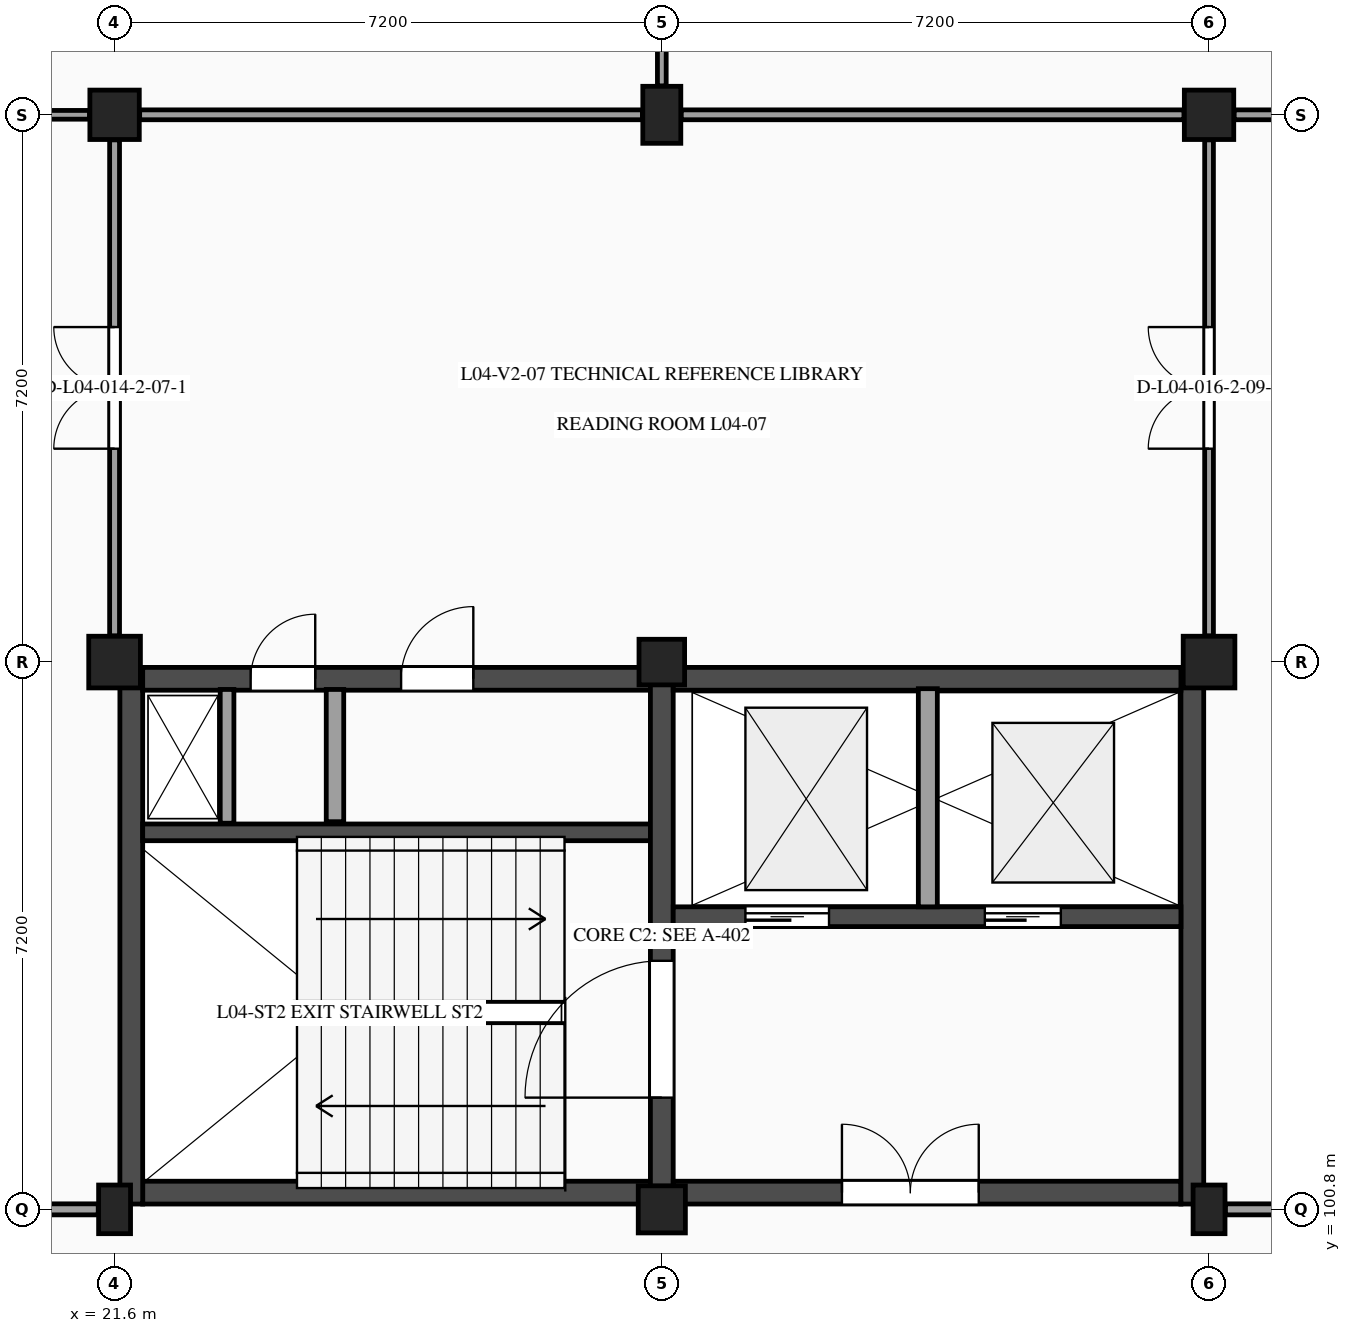
"""IFC4 building model, lengths in metres.
Left out: names, types, materials, properties, quantities, classifications, styles, units other than length and angle.
Written with IfcOpenShell. Run it as: python <this file> out.ifc"""

import sys

from ifc_helpers import new_model, si_unit, direction, frame, frame_2d, origin, origin_2d, place, context, subcontext, project, spatial, rectangle, extrude, element, fill, save


model = new_model("IFC4")
c1 = context("Model", 3, precision=1e-05, world=origin(), true_north=direction((0.0, 1.0)))
c2 = subcontext(c1, "Body", "Model", "MODEL_VIEW")
j1 = project(units=[si_unit("LENGTHUNIT", "METRE"), si_unit("PLANEANGLEUNIT", "RADIAN")], contexts=[c1])
p1 = place(None, origin())
s1 = spatial("IfcSite", under=j1, at=p1, CompositionType="ELEMENT")
p2 = place(p1, origin())
s2 = spatial("IfcBuilding", under=s1, at=p2, CompositionType="ELEMENT")
p3 = place(p2, frame((0.0, 0.0, 18.6)))
s3 = spatial("IfcBuildingStorey", under=s2, at=p3, CompositionType="ELEMENT", Elevation=18.6)
p4 = place(p3, frame((21.6, 100.8, 0.0), z_axis=(0.0, 0.0, 1.0), x_axis=(1.0, 0.0, 0.0)))
e1 = element("IfcColumn", 1, at=p4, inside=s3, PredefinedType="PILASTER", context=c2, shape_type="SweptSolid", body=[
    extrude(rectangle(XDim=0.42, YDim=0.64, at=origin_2d()), origin(), (0.0, 0.0, 1.0), 4.2),
])
p5 = place(p3, frame((21.6, 108.0, 0.0), z_axis=(0.0, 0.0, 1.0), x_axis=(1.0, 0.0, 0.0)))
e2 = element("IfcColumn", 2, at=p5, inside=s3, PredefinedType="COLUMN", context=c2, shape_type="SweptSolid", body=[
    extrude(rectangle(XDim=0.68, YDim=0.68, at=origin_2d()), origin(), (0.0, 0.0, 1.0), 4.2),
])
p6 = place(p3, frame((21.6, 115.2, 0.0), z_axis=(0.0, 0.0, 1.0), x_axis=(1.0, 0.0, 0.0)))
e3 = element("IfcColumn", 3, at=p6, inside=s3, PredefinedType="COLUMN", context=c2, shape_type="SweptSolid", body=[
    extrude(rectangle(XDim=0.65, YDim=0.65, at=origin_2d()), origin(), (0.0, 0.0, 1.0), 4.2),
])
p7 = place(p3, frame((28.8, 100.8, 0.0), z_axis=(0.0, 0.0, 1.0), x_axis=(1.0, 0.0, 0.0)))
e4 = element("IfcColumn", 4, at=p7, inside=s3, PredefinedType="COLUMN", context=c2, shape_type="SweptSolid", body=[
    extrude(rectangle(XDim=0.62, YDim=0.62, at=origin_2d()), origin(), (0.0, 0.0, 1.0), 4.2),
])
p8 = place(p3, frame((28.8, 108.0, 0.0), z_axis=(0.0, 0.0, 1.0), x_axis=(1.0, 0.0, 0.0)))
e5 = element("IfcColumn", 5, at=p8, inside=s3, PredefinedType="COLUMN", context=c2, shape_type="SweptSolid", body=[
    extrude(rectangle(XDim=0.6, YDim=0.6, at=origin_2d()), origin(), (0.0, 0.0, 1.0), 4.2),
])
p9 = place(p3, frame((28.8, 115.2, 0.0), z_axis=(0.0, 0.0, 1.0), x_axis=(1.0, 0.0, 0.0)))
e6 = element("IfcColumn", 6, at=p9, inside=s3, PredefinedType="COLUMN", context=c2, shape_type="SweptSolid", body=[
    extrude(rectangle(XDim=0.5, YDim=0.75, at=origin_2d()), origin(), (0.0, 0.0, 1.0), 4.2),
])
p10 = place(p3, frame((36.0, 100.8, 0.0), z_axis=(0.0, 0.0, 1.0), x_axis=(1.0, 0.0, 0.0)))
e7 = element("IfcColumn", 7, at=p10, inside=s3, PredefinedType="PILASTER", context=c2, shape_type="SweptSolid", body=[
    extrude(rectangle(XDim=0.42, YDim=0.64, at=origin_2d()), origin(), (0.0, 0.0, 1.0), 4.2),
])
p11 = place(p3, frame((36.0, 108.0, 0.0), z_axis=(0.0, 0.0, 1.0), x_axis=(1.0, 0.0, 0.0)))
e8 = element("IfcColumn", 8, at=p11, inside=s3, PredefinedType="COLUMN", context=c2, shape_type="SweptSolid", body=[
    extrude(rectangle(XDim=0.68, YDim=0.68, at=origin_2d()), origin(), (0.0, 0.0, 1.0), 4.2),
])
p12 = place(p3, frame((36.0, 115.2, 0.0), z_axis=(0.0, 0.0, 1.0), x_axis=(1.0, 0.0, 0.0)))
e9 = element("IfcColumn", 9, at=p12, inside=s3, PredefinedType="COLUMN", context=c2, shape_type="SweptSolid", body=[
    extrude(rectangle(XDim=0.65, YDim=0.65, at=origin_2d()), origin(), (0.0, 0.0, 1.0), 4.2),
])
p13 = place(p3, frame((21.97, 101.02, 0.0), z_axis=(0.0, 0.0, 1.0), x_axis=(1.0, 0.0, 0.0)))
e10 = element("IfcWall", 10, at=p13, inside=s3, PredefinedType="SHEAR", context=c2, shape_type="SweptSolid", body=[
    extrude(rectangle(XDim=6.68, YDim=0.3, at=frame_2d((3.34, 0.0))), origin(), (0.0, 0.0, 1.0), 3.955),
])
p14 = place(p3, frame((21.82, 107.93, 0.0), z_axis=(0.0, 0.0, 1.0), x_axis=(0.0, -1.0, 0.0)))
e11 = element("IfcWall", 11, at=p14, inside=s3, PredefinedType="SHEAR", context=c2, shape_type="SweptSolid", body=[
    extrude(rectangle(XDim=7.06, YDim=0.3, at=frame_2d((3.53, 0.0))), origin(), (0.0, 0.0, 1.0), 3.955),
])
p15 = place(p3, frame((21.97, 107.78, 0.0), z_axis=(0.0, 0.0, 1.0), x_axis=(1.0, 0.0, 0.0)))
e12 = element("IfcWall", 12, at=p15, inside=s3, PredefinedType="SHEAR", context=c2, shape_type="SweptSolid", body=[
    extrude(rectangle(XDim=6.68, YDim=0.3, at=frame_2d((3.34, 0.0))), origin(), (0.0, 0.0, 1.0), 3.955),
])
p16 = place(p15, frame((1.42, 0.0, 0.0)))
e13 = element("IfcOpeningElement", 13, at=p16, cuts=e12, PredefinedType="OPENING", context=c2, shape_type="SweptSolid", body=[
    extrude(rectangle(XDim=0.85, YDim=2.1, at=frame_2d((0.425, 1.05))), frame((0.0, 0.16, 0.0), z_axis=(0.0, -1.0, 0.0), x_axis=(1.0, 0.0, 0.0)), (0.0, 0.0, 1.0), 0.32),
])
p17 = place(p15, frame((3.4, 0.0, 0.0)))
e14 = element("IfcOpeningElement", 14, at=p17, cuts=e12, PredefinedType="OPENING", context=c2, shape_type="SweptSolid", body=[
    extrude(rectangle(XDim=0.95, YDim=2.15, at=frame_2d((0.475, 1.075))), frame((0.0, 0.16, 0.0), z_axis=(0.0, -1.0, 0.0), x_axis=(1.0, 0.0, 0.0)), (0.0, 0.0, 1.0), 0.32),
])
p18 = place(p3, frame((21.97, 105.76, 0.0), z_axis=(0.0, 0.0, 1.0), x_axis=(1.0, 0.0, 0.0)))
e15 = element("IfcWall", 15, at=p18, inside=s3, PredefinedType="SHEAR", context=c2, shape_type="SweptSolid", body=[
    extrude(rectangle(XDim=6.68, YDim=0.22, at=frame_2d((3.34, 0.0))), origin(), (0.0, 0.0, 1.0), 3.955),
])
p19 = place(p3, frame((24.5, 105.9, 0.0), z_axis=(0.0, 0.0, 1.0), x_axis=(0.0, 1.0, 0.0)))
e16 = element("IfcWall", 16, at=p19, inside=s3, PredefinedType="PARTITIONING", context=c2, shape_type="SweptSolid", body=[
    extrude(rectangle(XDim=1.74, YDim=0.23, at=frame_2d((0.87, 0.0))), origin(), (0.0, 0.0, 1.0), 3.955),
])
p20 = place(p3, frame((23.08, 105.88, 0.0), z_axis=(0.0, 0.0, 1.0), x_axis=(0.0, 1.0, 0.0)))
e17 = element("IfcWall", 17, at=p20, inside=s3, PredefinedType="PARTITIONING", context=c2, shape_type="SweptSolid", body=[
    extrude(rectangle(XDim=1.76, YDim=0.18, at=frame_2d((0.88, 0.0))), origin(), (0.0, 0.0, 1.0), 3.955),
])
p21 = place(p3, frame((28.8, 100.87, 0.0), z_axis=(0.0, 0.0, 1.0), x_axis=(0.0, 1.0, 0.0)))
e18 = element("IfcWall", 18, at=p21, inside=s3, PredefinedType="SHEAR", context=c2, shape_type="SweptSolid", body=[
    extrude(rectangle(XDim=7.06, YDim=0.3, at=frame_2d((3.53, 0.0))), origin(), (0.0, 0.0, 1.0), 3.955),
])
p22 = place(p21, frame((1.4, 0.0, 0.0)))
e19 = element("IfcOpeningElement", 19, at=p22, cuts=e18, PredefinedType="OPENING", context=c2, shape_type="SweptSolid", body=[
    extrude(rectangle(XDim=1.8, YDim=2.2, at=frame_2d((0.9, 1.1))), frame((0.0, 0.16, 0.0), z_axis=(0.0, -1.0, 0.0), x_axis=(1.0, 0.0, 0.0)), (0.0, 0.0, 1.0), 0.32),
])
p23 = place(p3, frame((28.95, 101.02, 0.0), z_axis=(0.0, 0.0, 1.0), x_axis=(1.0, 0.0, 0.0)))
e20 = element("IfcWall", 20, at=p23, inside=s3, PredefinedType="SHEAR", context=c2, shape_type="SweptSolid", body=[
    extrude(rectangle(XDim=6.68, YDim=0.3, at=frame_2d((3.34, 0.0))), origin(), (0.0, 0.0, 1.0), 3.955),
])
p24 = place(p23, frame((2.22, 0.0, 0.0)))
e21 = element("IfcOpeningElement", 21, at=p24, cuts=e20, PredefinedType="OPENING", context=c2, shape_type="SweptSolid", body=[
    extrude(rectangle(XDim=1.8, YDim=2.2, at=frame_2d((0.9, 1.1))), frame((0.0, 0.16, 0.0), z_axis=(0.0, -1.0, 0.0), x_axis=(1.0, 0.0, 0.0)), (0.0, 0.0, 1.0), 0.32),
])
p25 = place(p3, frame((35.78, 100.87, 0.0), z_axis=(0.0, 0.0, 1.0), x_axis=(0.0, 1.0, 0.0)))
e22 = element("IfcWall", 22, at=p25, inside=s3, PredefinedType="SHEAR", context=c2, shape_type="SweptSolid", body=[
    extrude(rectangle(XDim=7.06, YDim=0.3, at=frame_2d((3.53, 0.0))), origin(), (0.0, 0.0, 1.0), 3.955),
])
p26 = place(p3, frame((28.95, 107.78, 0.0), z_axis=(0.0, 0.0, 1.0), x_axis=(1.0, 0.0, 0.0)))
e23 = element("IfcWall", 23, at=p26, inside=s3, PredefinedType="SHEAR", context=c2, shape_type="SweptSolid", body=[
    extrude(rectangle(XDim=6.68, YDim=0.3, at=frame_2d((3.34, 0.0))), origin(), (0.0, 0.0, 1.0), 3.955),
])
p27 = place(p3, frame((28.95, 104.65, 0.0), z_axis=(0.0, 0.0, 1.0), x_axis=(1.0, 0.0, 0.0)))
e24 = element("IfcWall", 24, at=p27, inside=s3, PredefinedType="SHEAR", context=c2, shape_type="SweptSolid", body=[
    extrude(rectangle(XDim=6.68, YDim=0.26, at=frame_2d((3.34, 0.0))), origin(), (0.0, 0.0, 1.0), 3.955),
])
p28 = place(p27, frame((0.95, 0.0, 0.0)))
e25 = element("IfcOpeningElement", 25, at=p28, cuts=e24, PredefinedType="OPENING", context=c2, shape_type="SweptSolid", body=[
    extrude(rectangle(XDim=1.1, YDim=2.2, at=frame_2d((0.55, 1.1))), frame((0.0, 0.14, 0.0), z_axis=(0.0, -1.0, 0.0), x_axis=(1.0, 0.0, 0.0)), (0.0, 0.0, 1.0), 0.28),
])
p29 = place(p27, frame((4.1, 0.0, 0.0)))
e26 = element("IfcOpeningElement", 26, at=p29, cuts=e24, PredefinedType="OPENING", context=c2, shape_type="SweptSolid", body=[
    extrude(rectangle(XDim=1.0, YDim=2.15, at=frame_2d((0.5, 1.075))), frame((0.0, 0.14, 0.0), z_axis=(0.0, -1.0, 0.0), x_axis=(1.0, 0.0, 0.0)), (0.0, 0.0, 1.0), 0.28),
])
p30 = place(p3, frame((32.3, 104.78, 0.0), z_axis=(0.0, 0.0, 1.0), x_axis=(0.0, 1.0, 0.0)))
e27 = element("IfcWall", 27, at=p30, inside=s3, PredefinedType="PARTITIONING", context=c2, shape_type="SweptSolid", body=[
    extrude(rectangle(XDim=2.87, YDim=0.25, at=frame_2d((1.435, 0.0))), origin(), (0.0, 0.0, 1.0), 3.955),
])
p31 = place(p3, frame((14.715, 100.8, 0.0), z_axis=(0.0, 0.0, 1.0), x_axis=(1.0, 0.0, 0.0)))
e28 = element("IfcWall", 28, at=p31, inside=s3, PredefinedType="PARTITIONING", context=c2, shape_type="SweptSolid", body=[
    extrude(rectangle(XDim=6.67, YDim=0.145, at=frame_2d((3.335, 0.0))), origin(), (0.0, 0.0, 1.0), 3.295),
])
p32 = place(p3, frame((21.6, 108.345, 0.0), z_axis=(0.0, 0.0, 1.0), x_axis=(0.0, 1.0, 0.0)))
e29 = element("IfcWall", 29, at=p32, inside=s3, PredefinedType="PARTITIONING", context=c2, shape_type="SweptSolid", body=[
    extrude(rectangle(XDim=6.525, YDim=0.13, at=frame_2d((3.263, 0.0))), origin(), (0.0, 0.0, 1.0), 3.26),
])
p33 = place(p32, frame((2.462, 0.0, 0.0)))
e30 = element("IfcOpeningElement", 30, at=p33, cuts=e29, PredefinedType="OPENING", context=c2, shape_type="SweptSolid", body=[
    extrude(rectangle(XDim=1.6, YDim=2.2, at=frame_2d((0.8, 1.1))), frame((0.0, 0.075, 0.0), z_axis=(0.0, -1.0, 0.0), x_axis=(1.0, 0.0, 0.0)), (0.0, 0.0, 1.0), 0.15),
])
p34 = place(p3, frame((14.655, 115.2, 0.0), z_axis=(0.0, 0.0, 1.0), x_axis=(1.0, 0.0, 0.0)))
e31 = element("IfcWall", 31, at=p34, inside=s3, PredefinedType="PARTITIONING", context=c2, shape_type="SweptSolid", body=[
    extrude(rectangle(XDim=6.615, YDim=0.115, at=frame_2d((3.308, 0.0))), origin(), (0.0, 0.0, 1.0), 3.295),
])
p35 = place(p3, frame((21.93, 115.2, 0.0), z_axis=(0.0, 0.0, 1.0), x_axis=(1.0, 0.0, 0.0)))
e32 = element("IfcWall", 32, at=p35, inside=s3, PredefinedType="PARTITIONING", context=c2, shape_type="SweptSolid", body=[
    extrude(rectangle(XDim=6.615, YDim=0.13, at=frame_2d((3.308, 0.0))), origin(), (0.0, 0.0, 1.0), 3.305),
])
p36 = place(p3, frame((28.8, 115.58, 0.0), z_axis=(0.0, 0.0, 1.0), x_axis=(0.0, 1.0, 0.0)))
e33 = element("IfcWall", 33, at=p36, inside=s3, PredefinedType="PARTITIONING", context=c2, shape_type="SweptSolid", body=[
    extrude(rectangle(XDim=6.495, YDim=0.115, at=frame_2d((3.248, 0.0))), origin(), (0.0, 0.0, 1.0), 3.325),
])
p37 = place(p36, frame((2.448, 0.0, 0.0)))
e34 = element("IfcOpeningElement", 34, at=p37, cuts=e33, PredefinedType="OPENING", context=c2, shape_type="SweptSolid", body=[
    extrude(rectangle(XDim=1.6, YDim=2.2, at=frame_2d((0.8, 1.1))), frame((0.0, 0.067, 0.0), z_axis=(0.0, -1.0, 0.0), x_axis=(1.0, 0.0, 0.0)), (0.0, 0.0, 1.0), 0.135),
])
p38 = place(p3, frame((36.0, 108.345, 0.0), z_axis=(0.0, 0.0, 1.0), x_axis=(0.0, 1.0, 0.0)))
e35 = element("IfcWall", 35, at=p38, inside=s3, PredefinedType="PARTITIONING", context=c2, shape_type="SweptSolid", body=[
    extrude(rectangle(XDim=6.525, YDim=0.115, at=frame_2d((3.263, 0.0))), origin(), (0.0, 0.0, 1.0), 3.26),
])
p39 = place(p38, frame((2.462, 0.0, 0.0)))
e36 = element("IfcOpeningElement", 36, at=p39, cuts=e35, PredefinedType="OPENING", context=c2, shape_type="SweptSolid", body=[
    extrude(rectangle(XDim=1.6, YDim=2.2, at=frame_2d((0.8, 1.1))), frame((0.0, 0.067, 0.0), z_axis=(0.0, -1.0, 0.0), x_axis=(1.0, 0.0, 0.0)), (0.0, 0.0, 1.0), 0.135),
])
p40 = place(p3, frame((29.055, 115.2, 0.0), z_axis=(0.0, 0.0, 1.0), x_axis=(1.0, 0.0, 0.0)))
e37 = element("IfcWall", 37, at=p40, inside=s3, PredefinedType="PARTITIONING", context=c2, shape_type="SweptSolid", body=[
    extrude(rectangle(XDim=6.615, YDim=0.13, at=frame_2d((3.308, 0.0))), origin(), (0.0, 0.0, 1.0), 3.315),
])
p41 = place(p3, frame((36.215, 100.8, 0.0), z_axis=(0.0, 0.0, 1.0), x_axis=(1.0, 0.0, 0.0)))
e38 = element("IfcWall", 38, at=p41, inside=s3, PredefinedType="PARTITIONING", context=c2, shape_type="SweptSolid", body=[
    extrude(rectangle(XDim=6.67, YDim=0.145, at=frame_2d((3.335, 0.0))), origin(), (0.0, 0.0, 1.0), 3.155),
])
p42 = place(p3, frame((36.33, 115.2, 0.0), z_axis=(0.0, 0.0, 1.0), x_axis=(1.0, 0.0, 0.0)))
e39 = element("IfcWall", 39, at=p42, inside=s3, PredefinedType="PARTITIONING", context=c2, shape_type="SweptSolid", body=[
    extrude(rectangle(XDim=6.615, YDim=0.13, at=frame_2d((3.308, 0.0))), origin(), (0.0, 0.0, 1.0), 3.155),
])
p43 = place(p16, origin())
e40 = element("IfcDoor", 40, at=p43, inside=s3, OperationType="SINGLE_SWING_RIGHT", PredefinedType="DOOR", context=c2, shape_type="SweptSolid", body=[
    extrude(rectangle(XDim=0.85, YDim=2.1, at=frame_2d((0.425, 1.05))), frame((0.0, 0.025, 0.0), z_axis=(0.0, -1.0, 0.0), x_axis=(1.0, 0.0, 0.0)), (0.0, 0.0, 1.0), 0.05),
])
fill(e13, e40)
p44 = place(p22, origin())
e41 = element("IfcDoor", 41, at=p44, inside=s3, OperationType="SINGLE_SWING_LEFT", PredefinedType="DOOR", context=c2, shape_type="SweptSolid", body=[
    extrude(rectangle(XDim=1.8, YDim=2.2, at=frame_2d((0.9, 1.1))), frame((0.0, 0.025, 0.0), z_axis=(0.0, -1.0, 0.0), x_axis=(1.0, 0.0, 0.0)), (0.0, 0.0, 1.0), 0.05),
])
fill(e19, e41)
p45 = place(p17, origin())
e42 = element("IfcDoor", 42, at=p45, inside=s3, OperationType="SINGLE_SWING_RIGHT", PredefinedType="DOOR", context=c2, shape_type="SweptSolid", body=[
    extrude(rectangle(XDim=0.95, YDim=2.15, at=frame_2d((0.475, 1.075))), frame((0.0, 0.025, 0.0), z_axis=(0.0, -1.0, 0.0), x_axis=(1.0, 0.0, 0.0)), (0.0, 0.0, 1.0), 0.05),
])
fill(e14, e42)
p46 = place(p28, origin())
e43 = element("IfcDoor", 43, at=p46, inside=s3, OperationType="SLIDING_TO_LEFT", PredefinedType="DOOR", context=c2, shape_type="SweptSolid", body=[
    extrude(rectangle(XDim=1.1, YDim=2.2, at=frame_2d((0.55, 1.1))), frame((0.0, 0.025, 0.0), z_axis=(0.0, -1.0, 0.0), x_axis=(1.0, 0.0, 0.0)), (0.0, 0.0, 1.0), 0.05),
])
fill(e25, e43)
p47 = place(p29, origin())
e44 = element("IfcDoor", 44, at=p47, inside=s3, OperationType="SLIDING_TO_RIGHT", PredefinedType="DOOR", context=c2, shape_type="SweptSolid", body=[
    extrude(rectangle(XDim=1.0, YDim=2.15, at=frame_2d((0.5, 1.075))), frame((0.0, 0.025, 0.0), z_axis=(0.0, -1.0, 0.0), x_axis=(1.0, 0.0, 0.0)), (0.0, 0.0, 1.0), 0.05),
])
fill(e26, e44)
p48 = place(p24, origin())
e45 = element("IfcDoor", 45, at=p48, inside=s3, OperationType="DOUBLE_DOOR_SINGLE_SWING", PredefinedType="DOOR", context=c2, shape_type="SweptSolid", body=[
    extrude(rectangle(XDim=1.8, YDim=2.2, at=frame_2d((0.9, 1.1))), frame((0.0, 0.025, 0.0), z_axis=(0.0, -1.0, 0.0), x_axis=(1.0, 0.0, 0.0)), (0.0, 0.0, 1.0), 0.05),
])
fill(e21, e45)
p49 = place(p33, origin())
e46 = element("IfcDoor", 46, at=p49, inside=s3, OperationType="DOUBLE_DOOR_SINGLE_SWING", PredefinedType="DOOR", context=c2, shape_type="SweptSolid", body=[
    extrude(rectangle(XDim=1.6, YDim=2.2, at=frame_2d((0.8, 1.1))), frame((0.0, 0.025, 0.0), z_axis=(0.0, -1.0, 0.0), x_axis=(1.0, 0.0, 0.0)), (0.0, 0.0, 1.0), 0.05),
])
fill(e30, e46)
p50 = place(p39, origin())
e47 = element("IfcDoor", 47, at=p50, inside=s3, OperationType="DOUBLE_DOOR_SINGLE_SWING", PredefinedType="DOOR", context=c2, shape_type="SweptSolid", body=[
    extrude(rectangle(XDim=1.6, YDim=2.2, at=frame_2d((0.8, 1.1))), frame((0.0, 0.025, 0.0), z_axis=(0.0, -1.0, 0.0), x_axis=(1.0, 0.0, 0.0)), (0.0, 0.0, 1.0), 0.05),
])
fill(e36, e47)
save(model, sys.argv[1])
